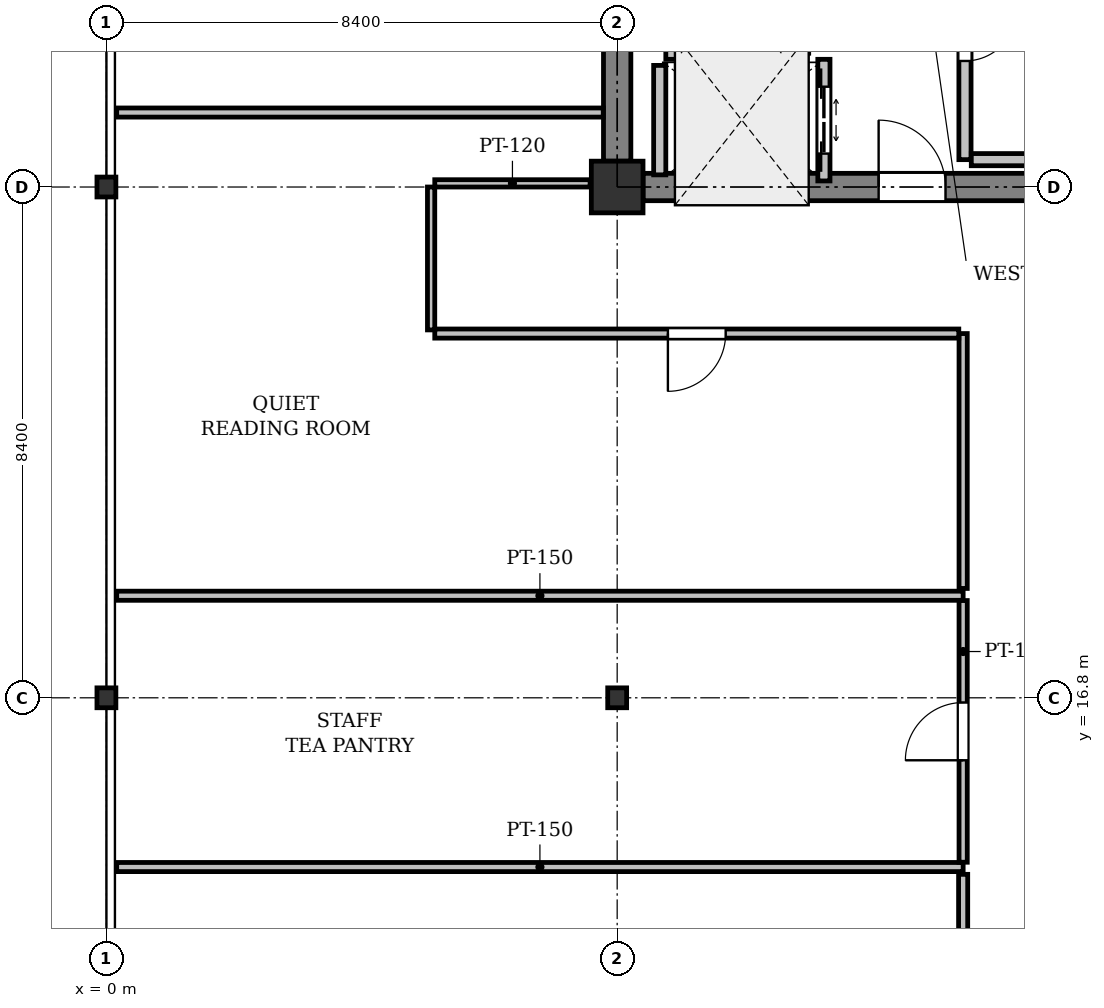
"""IFC4 building model, lengths in metres.
Left out: names, types, materials, properties, quantities, classifications, styles, units other than length and angle.
Written with IfcOpenShell. Run it as: python <this file> out.ifc"""

import sys

from ifc_helpers import new_model, si_unit, direction, frame, frame_2d, origin, origin_2d, place, context, subcontext, project, spatial, rectangle, i_section, extrude, element, fill, save


model = new_model("IFC4")
c1 = context("Model", 3, precision=1e-05, world=origin(), true_north=direction((0.0, 1.0)))
c2 = subcontext(c1, "Body", "Model", "MODEL_VIEW")
j1 = project(units=[si_unit("LENGTHUNIT", "METRE"), si_unit("PLANEANGLEUNIT", "RADIAN")], contexts=[c1])
p1 = place(None, origin())
s1 = spatial("IfcSite", under=j1, at=p1, CompositionType="ELEMENT")
p2 = place(p1, origin())
s2 = spatial("IfcBuilding", under=s1, at=p2, CompositionType="ELEMENT")
p3 = place(p2, frame((0.0, 0.0, 290.2)))
s3 = spatial("IfcBuildingStorey", under=s2, at=p3, CompositionType="ELEMENT", Elevation=290.2)
for number, where, z_axis, x_axis in (
    (1, (0.0, 16.8, 0.0), (0.0, 0.0, 1.0), (1.0, 0.0, 0.0)),
    (2, (0.0, 25.2, 0.0), (0.0, 0.0, 1.0), (1.0, 0.0, 0.0)),
    (3, (8.4, 16.8, 0.0), (0.0, 0.0, 1.0), (1.0, 0.0, 0.0)),
):
    element("IfcColumn", number, at=place(p3, frame(where, z_axis=z_axis, x_axis=x_axis)), inside=s3, PredefinedType="COLUMN", context=c2, shape_type="SweptSolid", body=[
        extrude(i_section(OverallWidth=0.311, OverallDepth=0.327, WebThickness=0.016, FlangeThickness=0.025, FilletRadius=0.017, at=origin_2d()), origin(), (0.0, 0.0, 1.0), 4.0),
    ])
p4 = place(p3, frame((8.4, 25.2, 0.0), z_axis=(0.0, 0.0, 1.0), x_axis=(1.0, 0.0, 0.0)))
e4 = element("IfcColumn", 4, at=p4, inside=s3, PredefinedType="COLUMN", context=c2, shape_type="SweptSolid", body=[
    extrude(rectangle(XDim=0.85, YDim=0.85, at=origin_2d()), origin(), (0.0, 0.0, 1.0), 4.0),
])
p5 = place(p3, frame((8.4, 25.625, 0.0), z_axis=(0.0, 0.0, 1.0), x_axis=(0.0, 1.0, 0.0)))
e5 = element("IfcWall", 5, at=p5, inside=s3, PredefinedType="SHEAR", context=c2, shape_type="SweptSolid", body=[
    extrude(rectangle(XDim=7.55, YDim=0.45, at=frame_2d((3.775, 0.0))), origin(), (0.0, 0.0, 1.0), 3.725),
])
p6 = place(p3, frame((8.825, 25.2, 0.0), z_axis=(0.0, 0.0, 1.0), x_axis=(1.0, 0.0, 0.0)))
e6 = element("IfcWall", 6, at=p6, inside=s3, PredefinedType="SHEAR", context=c2, shape_type="SweptSolid", body=[
    extrude(rectangle(XDim=7.55, YDim=0.45, at=frame_2d((3.775, 0.0))), origin(), (0.0, 0.0, 1.0), 3.725),
])
p7 = place(p6, frame((3.875, 0.0, 0.0)))
e7 = element("IfcOpeningElement", 7, at=p7, cuts=e6, PredefinedType="OPENING", context=c2, shape_type="SweptSolid", body=[
    extrude(rectangle(XDim=1.1, YDim=2.15, at=frame_2d((0.55, 1.075))), frame((0.0, 0.235, 0.0), z_axis=(0.0, -1.0, 0.0), x_axis=(1.0, 0.0, 0.0)), (0.0, 0.0, 1.0), 0.47),
])
p8 = place(p3, frame((11.45, 27.4, 0.0), z_axis=(0.0, 0.0, 1.0), x_axis=(0.0, 1.0, 0.0)))
e8 = element("IfcWall", 8, at=p8, inside=s3, PredefinedType="PARTITIONING", context=c2, shape_type="SweptSolid", body=[
    extrude(rectangle(XDim=2.25, YDim=0.2, at=frame_2d((1.125, 0.0))), origin(), (0.0, 0.0, 1.0), 3.725),
])
p9 = place(p8, frame((0.575, 0.0, 0.0)))
e9 = element("IfcOpeningElement", 9, at=p9, cuts=e8, PredefinedType="OPENING", context=c2, shape_type="SweptSolid", body=[
    extrude(rectangle(XDim=1.1, YDim=2.2, at=frame_2d((0.55, 1.1))), frame((0.0, 0.11, 0.0), z_axis=(0.0, -1.0, 0.0), x_axis=(1.0, 0.0, 0.0)), (0.0, 0.0, 1.0), 0.22),
])
p10 = place(p3, frame((9.2, 27.4, 0.0), z_axis=(0.0, 0.0, 1.0), x_axis=(1.0, 0.0, 0.0)))
e10 = element("IfcWall", 10, at=p10, inside=s3, PredefinedType="PARTITIONING", context=c2, shape_type="SweptSolid", body=[
    extrude(rectangle(XDim=2.15, YDim=0.2, at=frame_2d((1.075, 0.0))), origin(), (0.0, 0.0, 1.0), 3.725),
])
p11 = place(p3, frame((11.8, 25.3, 0.0), z_axis=(0.0, 0.0, 1.0), x_axis=(0.0, 1.0, 0.0)))
e11 = element("IfcWall", 11, at=p11, inside=s3, PredefinedType="PARTITIONING", context=c2, shape_type="SweptSolid", body=[
    extrude(rectangle(XDim=2.0, YDim=0.2, at=frame_2d((1.0, 0.0))), origin(), (0.0, 0.0, 1.0), 3.725),
])
p12 = place(p11, frame((0.45, 0.0, 0.0)))
e12 = element("IfcOpeningElement", 12, at=p12, cuts=e11, PredefinedType="OPENING", context=c2, shape_type="SweptSolid", body=[
    extrude(rectangle(XDim=1.1, YDim=2.2, at=frame_2d((0.55, 1.1))), frame((0.0, 0.11, 0.0), z_axis=(0.0, -1.0, 0.0), x_axis=(1.0, 0.0, 0.0)), (0.0, 0.0, 1.0), 0.22),
])
p13 = place(p3, frame((9.1, 25.4, 0.0), z_axis=(0.0, 0.0, 1.0), x_axis=(0.0, 1.0, 0.0)))
e13 = element("IfcWall", 13, at=p13, inside=s3, PredefinedType="PARTITIONING", context=c2, shape_type="SweptSolid", body=[
    extrude(rectangle(XDim=1.8, YDim=0.2, at=frame_2d((0.9, 0.0))), origin(), (0.0, 0.0, 1.0), 3.725),
])
p14 = place(p3, frame((14.12, 29.746, 0.0), z_axis=(0.0, 0.0, 1.0), x_axis=(0.0, -1.0, 0.0)))
e14 = element("IfcWall", 14, at=p14, inside=s3, PredefinedType="PARTITIONING", context=c2, shape_type="SweptSolid", body=[
    extrude(rectangle(XDim=4.096, YDim=0.2, at=frame_2d((2.048, 0.0))), origin(), (0.0, 0.0, 1.0), 3.725),
])
p15 = place(p14, frame((1.623, 0.0, 0.0)))
e15 = element("IfcOpeningElement", 15, at=p15, cuts=e14, PredefinedType="OPENING", context=c2, shape_type="SweptSolid", body=[
    extrude(rectangle(XDim=0.85, YDim=2.15, at=frame_2d((0.425, 1.075))), frame((0.0, 0.11, 0.0), z_axis=(0.0, -1.0, 0.0), x_axis=(1.0, 0.0, 0.0)), (0.0, 0.0, 1.0), 0.22),
])
p16 = place(p3, frame((14.224, 25.65, 0.0), z_axis=(0.0, 0.0, 1.0), x_axis=(1.0, 0.0, 0.0)))
e16 = element("IfcWall", 16, at=p16, inside=s3, PredefinedType="PARTITIONING", context=c2, shape_type="SweptSolid", body=[
    extrude(rectangle(XDim=2.122, YDim=0.2, at=frame_2d((1.061, 0.0))), origin(), (0.0, 0.0, 1.0), 3.725),
])
for number, where, z_axis, x_axis in (
    (17, (14.09, 18.479, 0.0), (0.0, 0.0, 1.0), (-1.0, 0.0, 0.0)),
    (18, (0.169, 14.017, 0.0), (0.0, 0.0, 1.0), (1.0, 0.0, 0.0)),
):
    element("IfcWall", number, at=place(p3, frame(where, z_axis=z_axis, x_axis=x_axis)), inside=s3, PredefinedType="PARTITIONING", context=c2, shape_type="SweptSolid", body=[
        extrude(rectangle(XDim=13.921, YDim=0.15, at=frame_2d((6.96, 0.0))), origin(), (0.0, 0.0, 1.0), 3.319),
    ])
p17 = place(p3, frame((14.09, 14.096, 0.0), z_axis=(0.0, 0.0, 1.0), x_axis=(0.0, 1.0, 0.0)))
e19 = element("IfcWall", 19, at=p17, inside=s3, PredefinedType="PARTITIONING", context=c2, shape_type="SweptSolid", body=[
    extrude(rectangle(XDim=4.303, YDim=0.135, at=frame_2d((2.152, 0.0))), origin(), (0.0, 0.0, 1.0), 3.271),
])
p18 = place(p17, frame((1.677, 0.0, 0.0)))
e20 = element("IfcOpeningElement", 20, at=p18, cuts=e19, PredefinedType="OPENING", context=c2, shape_type="SweptSolid", body=[
    extrude(rectangle(XDim=0.95, YDim=2.15, at=frame_2d((0.475, 1.075))), frame((0.0, 0.077, 0.0), z_axis=(0.0, -1.0, 0.0), x_axis=(1.0, 0.0, 0.0)), (0.0, 0.0, 1.0), 0.155),
])
p19 = place(p3, frame((5.4, 25.26, 0.0), z_axis=(0.0, 0.0, 1.0), x_axis=(1.0, 0.0, 0.0)))
e21 = element("IfcWall", 21, at=p19, inside=s3, PredefinedType="PARTITIONING", context=c2, shape_type="SweptSolid", body=[
    extrude(rectangle(XDim=2.555, YDim=0.12, at=frame_2d((1.278, 0.0))), origin(), (0.0, 0.0, 1.0), 3.271),
])
p20 = place(p3, frame((8.171, 26.425, 0.0), z_axis=(0.0, 0.0, 1.0), x_axis=(-1.0, 0.0, 0.0)))
e22 = element("IfcWall", 22, at=p20, inside=s3, PredefinedType="PARTITIONING", context=c2, shape_type="SweptSolid", body=[
    extrude(rectangle(XDim=8.002, YDim=0.15, at=frame_2d((4.001, 0.0))), origin(), (0.0, 0.0, 1.0), 3.421),
])
p21 = place(p3, frame((14.09, 18.598, 0.0), z_axis=(0.0, 0.0, 1.0), x_axis=(0.0, 1.0, 0.0)))
e23 = element("IfcWall", 23, at=p21, inside=s3, PredefinedType="PARTITIONING", context=c2, shape_type="SweptSolid", body=[
    extrude(rectangle(XDim=4.192, YDim=0.135, at=frame_2d((2.096, 0.0))), origin(), (0.0, 0.0, 1.0), 3.725),
])
p22 = place(p3, frame((14.019, 22.79, 0.0), z_axis=(0.0, 0.0, 1.0), x_axis=(-1.0, 0.0, 0.0)))
e24 = element("IfcWall", 24, at=p22, inside=s3, PredefinedType="PARTITIONING", context=c2, shape_type="SweptSolid", body=[
    extrude(rectangle(XDim=8.619, YDim=0.15, at=frame_2d((4.309, 0.0))), origin(), (0.0, 0.0, 1.0), 3.319),
])
p23 = place(p22, frame((3.834, 0.0, 0.0)))
e25 = element("IfcOpeningElement", 25, at=p23, cuts=e24, PredefinedType="OPENING", context=c2, shape_type="SweptSolid", body=[
    extrude(rectangle(XDim=0.95, YDim=2.15, at=frame_2d((0.475, 1.075))), frame((0.0, 0.085, 0.0), z_axis=(0.0, -1.0, 0.0), x_axis=(1.0, 0.0, 0.0)), (0.0, 0.0, 1.0), 0.17),
])
p24 = place(p3, frame((5.34, 22.85, 0.0), z_axis=(0.0, 0.0, 1.0), x_axis=(0.0, 1.0, 0.0)))
e26 = element("IfcWall", 26, at=p24, inside=s3, PredefinedType="PARTITIONING", context=c2, shape_type="SweptSolid", body=[
    extrude(rectangle(XDim=2.35, YDim=0.12, at=frame_2d((1.175, 0.0))), origin(), (0.0, 0.0, 1.0), 3.271),
])
p25 = place(p3, frame((14.09, 7.789, 0.0), z_axis=(0.0, 0.0, 1.0), x_axis=(0.0, 1.0, 0.0)))
e27 = element("IfcWall", 27, at=p25, inside=s3, PredefinedType="PARTITIONING", context=c2, shape_type="SweptSolid", body=[
    extrude(rectangle(XDim=6.108, YDim=0.15, at=frame_2d((3.054, 0.0))), origin(), (0.0, 0.0, 1.0), 3.271),
])
p26 = place(p7, origin())
e28 = element("IfcDoor", 28, at=p26, inside=s3, OperationType="SINGLE_SWING_LEFT", PredefinedType="DOOR", context=c2, shape_type="SweptSolid", body=[
    extrude(rectangle(XDim=1.1, YDim=2.15, at=frame_2d((0.55, 1.075))), frame((0.0, 0.025, 0.0), z_axis=(0.0, -1.0, 0.0), x_axis=(1.0, 0.0, 0.0)), (0.0, 0.0, 1.0), 0.05),
])
fill(e7, e28)
p27 = place(p12, origin())
e29 = element("IfcDoor", 29, at=p27, inside=s3, OperationType="DOUBLE_DOOR_SLIDING", PredefinedType="DOOR", context=c2, shape_type="SweptSolid", body=[
    extrude(rectangle(XDim=1.1, YDim=2.2, at=frame_2d((0.55, 1.1))), frame((0.0, 0.025, 0.0), z_axis=(0.0, -1.0, 0.0), x_axis=(1.0, 0.0, 0.0)), (0.0, 0.0, 1.0), 0.05),
])
fill(e12, e29)
p28 = place(p15, origin())
e30 = element("IfcDoor", 30, at=p28, inside=s3, OperationType="SINGLE_SWING_LEFT", PredefinedType="DOOR", context=c2, shape_type="SweptSolid", body=[
    extrude(rectangle(XDim=0.85, YDim=2.15, at=frame_2d((0.425, 1.075))), frame((0.0, 0.025, 0.0), z_axis=(0.0, -1.0, 0.0), x_axis=(1.0, 0.0, 0.0)), (0.0, 0.0, 1.0), 0.05),
])
fill(e15, e30)
p29 = place(p18, origin())
e31 = element("IfcDoor", 31, at=p29, inside=s3, OperationType="SINGLE_SWING_LEFT", PredefinedType="DOOR", context=c2, shape_type="SweptSolid", body=[
    extrude(rectangle(XDim=0.95, YDim=2.15, at=frame_2d((0.475, 1.075))), frame((0.0, 0.025, 0.0), z_axis=(0.0, -1.0, 0.0), x_axis=(1.0, 0.0, 0.0)), (0.0, 0.0, 1.0), 0.05),
])
fill(e20, e31)
p30 = place(p23, origin())
e32 = element("IfcDoor", 32, at=p30, inside=s3, OperationType="SINGLE_SWING_RIGHT", PredefinedType="DOOR", context=c2, shape_type="SweptSolid", body=[
    extrude(rectangle(XDim=0.95, YDim=2.15, at=frame_2d((0.475, 1.075))), frame((0.0, 0.025, 0.0), z_axis=(0.0, -1.0, 0.0), x_axis=(1.0, 0.0, 0.0)), (0.0, 0.0, 1.0), 0.05),
])
fill(e25, e32)
save(model, sys.argv[1])
